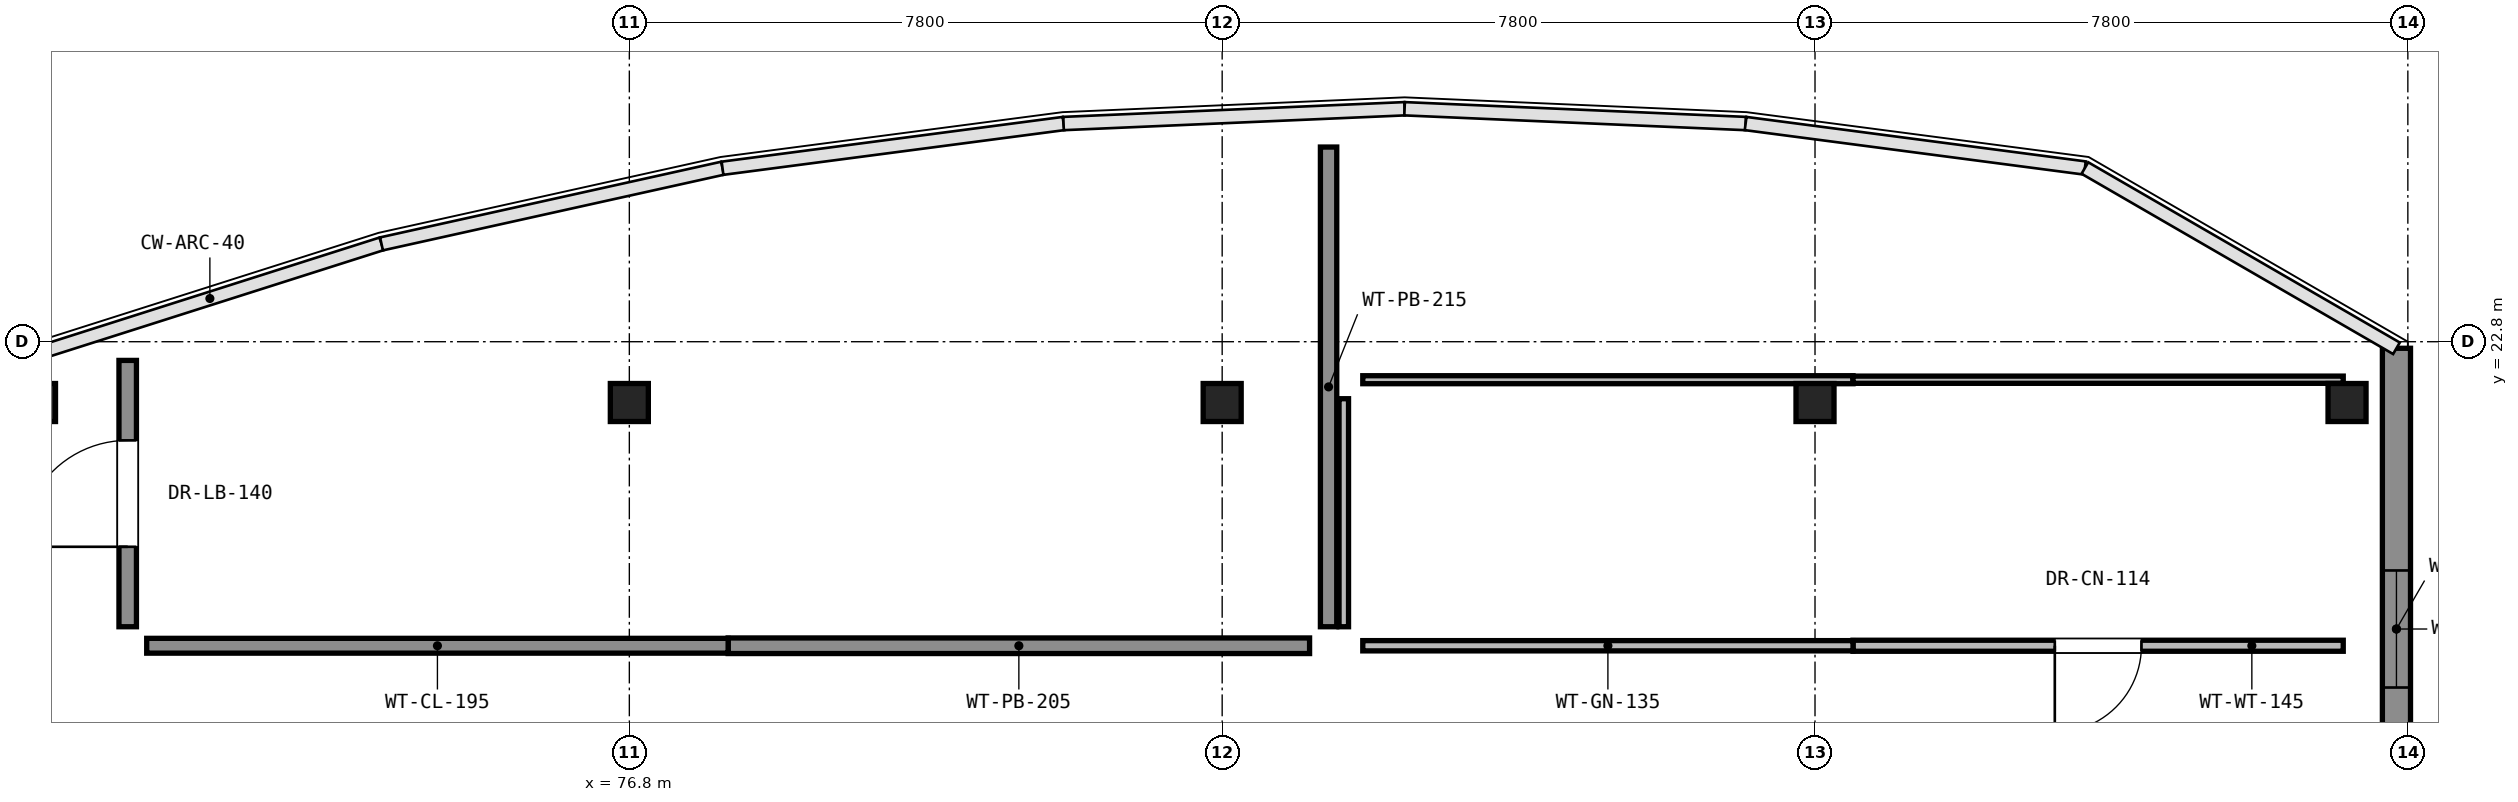
"""IFC4 building model, lengths in metres.
Left out: names, types, materials, properties, quantities, classifications, styles, units other than length and angle.
Written with IfcOpenShell. Run it as: python <this file> out.ifc"""

import sys

from ifc_helpers import new_model, si_unit, direction, frame, frame_2d, origin, origin_2d, place, context, subcontext, project, spatial, rectangle, extrude, element, fill, save


model = new_model("IFC4")
c1 = context("Model", 3, precision=1e-05, world=origin(), true_north=direction((0.0, 1.0)))
c2 = subcontext(c1, "Body", "Model", "MODEL_VIEW")
j1 = project(units=[si_unit("LENGTHUNIT", "METRE"), si_unit("PLANEANGLEUNIT", "RADIAN")], contexts=[c1])
p1 = place(None, origin())
s1 = spatial("IfcSite", under=j1, at=p1, CompositionType="ELEMENT")
p2 = place(p1, origin())
s2 = spatial("IfcBuilding", under=s1, at=p2, CompositionType="ELEMENT")
p3 = place(p2, frame((0.0, 0.0, 17.68)))
s3 = spatial("IfcBuildingStorey", under=s2, at=p3, CompositionType="ELEMENT", Elevation=17.68)
for number, where, z_axis, x_axis in (
    (1, (69.0, 22.0, 0.0), (0.0, 0.0, 1.0), (1.0, 0.0, 0.0)),
    (2, (76.8, 22.0, 0.0), (0.0, 0.0, 1.0), (1.0, 0.0, 0.0)),
    (3, (84.6, 22.0, 0.0), (0.0, 0.0, 1.0), (1.0, 0.0, 0.0)),
    (4, (92.4, 22.0, 0.0), (0.0, 0.0, 1.0), (1.0, 0.0, 0.0)),
    (5, (99.4, 22.0, 0.0), (0.0, 0.0, 1.0), (1.0, 0.0, 0.0)),
):
    element("IfcColumn", number, at=place(p3, frame(where, z_axis=z_axis, x_axis=x_axis)), inside=s3, PredefinedType="COLUMN", context=c2, shape_type="SweptSolid", body=[
        extrude(rectangle(XDim=0.5, YDim=0.5, at=origin_2d()), origin(), (0.0, 0.0, 1.0), 4.08),
    ])
p4 = place(p3, frame((100.05, 22.713, 0.0), z_axis=(0.0, 0.0, 1.0), x_axis=(0.0, -1.0, 0.0)))
e6 = element("IfcWall", 6, at=p4, inside=s3, PredefinedType="SOLIDWALL", context=c2, shape_type="SweptSolid", body=[
    extrude(rectangle(XDim=7.386, YDim=0.37, at=frame_2d((3.693, 0.0))), origin(), (0.0, 0.0, 1.0), 3.775),
])
p5 = place(p4, frame((2.923, 0.0, 0.9)))
e7 = element("IfcOpeningElement", 7, at=p5, cuts=e6, PredefinedType="OPENING", context=c2, shape_type="SweptSolid", body=[
    extrude(rectangle(XDim=1.54, YDim=1.62, at=frame_2d((0.77, 0.81))), frame((0.0, 0.195, 0.0), z_axis=(0.0, -1.0, 0.0), x_axis=(1.0, 0.0, 0.0)), (0.0, 0.0, 1.0), 0.39),
])
p6 = place(p3, frame((70.2, 19.05, 0.0), z_axis=(0.0, 0.0, 1.0), x_axis=(0.0, 1.0, 0.0)))
e8 = element("IfcWall", 8, at=p6, inside=s3, PredefinedType="PARTITIONING", context=c2, shape_type="SweptSolid", body=[
    extrude(rectangle(XDim=3.504, YDim=0.23, at=frame_2d((1.752, 0.0))), origin(), (0.0, 0.0, 1.0), 3.025),
])
p7 = place(p6, frame((1.052, 0.0, 0.0)))
e9 = element("IfcOpeningElement", 9, at=p7, cuts=e8, PredefinedType="OPENING", context=c2, shape_type="SweptSolid", body=[
    extrude(rectangle(XDim=1.4, YDim=2.2, at=frame_2d((0.7, 1.1))), frame((0.0, 0.125, 0.0), z_axis=(0.0, -1.0, 0.0), x_axis=(1.0, 0.0, 0.0)), (0.0, 0.0, 1.0), 0.25),
])
p8 = place(p3, frame((86.0, 25.361, 0.0), z_axis=(0.0, 0.0, 1.0), x_axis=(0.0, -1.0, 0.0)))
e10 = element("IfcWall", 10, at=p8, inside=s3, PredefinedType="PARTITIONING", context=c2, shape_type="SweptSolid", body=[
    extrude(rectangle(XDim=6.311, YDim=0.215, at=frame_2d((3.156, 0.0))), origin(), (0.0, 0.0, 1.0), 3.225),
])
p9 = place(p3, frame((85.75, 18.8, 0.0), z_axis=(0.0, 0.0, 1.0), x_axis=(-1.0, 0.0, 0.0)))
e11 = element("IfcWall", 11, at=p9, inside=s3, PredefinedType="PARTITIONING", context=c2, shape_type="SweptSolid", body=[
    extrude(rectangle(XDim=7.65, YDim=0.205, at=frame_2d((3.825, 0.0))), origin(), (0.0, 0.0, 1.0), 3.225),
])
p10 = place(p3, frame((78.1, 18.8, 0.0), z_axis=(0.0, 0.0, 1.0), x_axis=(-1.0, 0.0, 0.0)))
e12 = element("IfcWall", 12, at=p10, inside=s3, PredefinedType="PARTITIONING", context=c2, shape_type="SweptSolid", body=[
    extrude(rectangle(XDim=7.65, YDim=0.195, at=frame_2d((3.825, 0.0))), origin(), (0.0, 0.0, 1.0), 3.025),
])
p11 = place(p3, frame((86.45, 22.3, 0.0), z_axis=(0.0, 0.0, 1.0), x_axis=(1.0, 0.0, 0.0)))
e13 = element("IfcWall", 13, at=p11, inside=s3, PredefinedType="PARTITIONING", context=c2, shape_type="SweptSolid", body=[
    extrude(rectangle(XDim=6.45, YDim=0.105, at=frame_2d((3.225, 0.0))), origin(), (0.0, 0.0, 1.0), 3.175),
])
p12 = place(p3, frame((92.9, 22.3, 0.0), z_axis=(0.0, 0.0, 1.0), x_axis=(1.0, 0.0, 0.0)))
e14 = element("IfcWall", 14, at=p12, inside=s3, PredefinedType="PARTITIONING", context=c2, shape_type="SweptSolid", body=[
    extrude(rectangle(XDim=6.45, YDim=0.095, at=frame_2d((3.225, 0.0))), origin(), (0.0, 0.0, 1.0), 3.175),
])
p13 = place(p3, frame((99.35, 18.8, 0.0), z_axis=(0.0, 0.0, 1.0), x_axis=(-1.0, 0.0, 0.0)))
e15 = element("IfcWall", 15, at=p13, inside=s3, PredefinedType="PARTITIONING", context=c2, shape_type="SweptSolid", body=[
    extrude(rectangle(XDim=6.45, YDim=0.145, at=frame_2d((3.225, 0.0))), origin(), (0.0, 0.0, 1.0), 3.125),
])
p14 = place(p13, frame((2.655, 0.0, 0.0)))
e16 = element("IfcOpeningElement", 16, at=p14, cuts=e15, PredefinedType="OPENING", context=c2, shape_type="SweptSolid", body=[
    extrude(rectangle(XDim=1.14, YDim=2.2, at=frame_2d((0.57, 1.1))), frame((0.0, 0.083, 0.0), z_axis=(0.0, -1.0, 0.0), x_axis=(1.0, 0.0, 0.0)), (0.0, 0.0, 1.0), 0.165),
])
p15 = place(p3, frame((92.9, 18.8, 0.0), z_axis=(0.0, 0.0, 1.0), x_axis=(-1.0, 0.0, 0.0)))
e17 = element("IfcWall", 17, at=p15, inside=s3, PredefinedType="PARTITIONING", context=c2, shape_type="SweptSolid", body=[
    extrude(rectangle(XDim=6.45, YDim=0.135, at=frame_2d((3.225, 0.0))), origin(), (0.0, 0.0, 1.0), 3.175),
])
p16 = place(p3, frame((86.2, 19.05, 0.0), z_axis=(0.0, 0.0, 1.0), x_axis=(0.0, 1.0, 0.0)))
e18 = element("IfcWall", 18, at=p16, inside=s3, PredefinedType="PARTITIONING", context=c2, shape_type="SweptSolid", body=[
    extrude(rectangle(XDim=3.0, YDim=0.125, at=frame_2d((1.5, 0.0))), origin(), (0.0, 0.0, 1.0), 3.225),
])
p17 = place(p5, origin())
e19 = element("IfcWindow", 19, at=p17, inside=s3, PartitioningType="SINGLE_PANEL", PredefinedType="WINDOW", context=c2, shape_type="SweptSolid", body=[
    extrude(rectangle(XDim=1.54, YDim=1.62, at=frame_2d((0.77, 0.81))), frame((0.0, 0.03, 0.0), z_axis=(0.0, -1.0, 0.0), x_axis=(1.0, 0.0, 0.0)), (0.0, 0.0, 1.0), 0.06),
])
fill(e7, e19)
p18 = place(p7, origin())
e20 = element("IfcDoor", 20, at=p18, inside=s3, OperationType="SINGLE_SWING_LEFT", PredefinedType="DOOR", context=c2, shape_type="SweptSolid", body=[
    extrude(rectangle(XDim=1.4, YDim=2.2, at=frame_2d((0.7, 1.1))), frame((0.0, 0.025, 0.0), z_axis=(0.0, -1.0, 0.0), x_axis=(1.0, 0.0, 0.0)), (0.0, 0.0, 1.0), 0.05),
])
fill(e9, e20)
p19 = place(p14, origin())
e21 = element("IfcDoor", 21, at=p19, inside=s3, OperationType="SINGLE_SWING_RIGHT", PredefinedType="DOOR", context=c2, shape_type="SweptSolid", body=[
    extrude(rectangle(XDim=1.14, YDim=2.2, at=frame_2d((0.57, 1.1))), frame((0.0, 0.025, 0.0), z_axis=(0.0, -1.0, 0.0), x_axis=(1.0, 0.0, 0.0)), (0.0, 0.0, 1.0), 0.05),
])
fill(e16, e21)
save(model, sys.argv[1])
